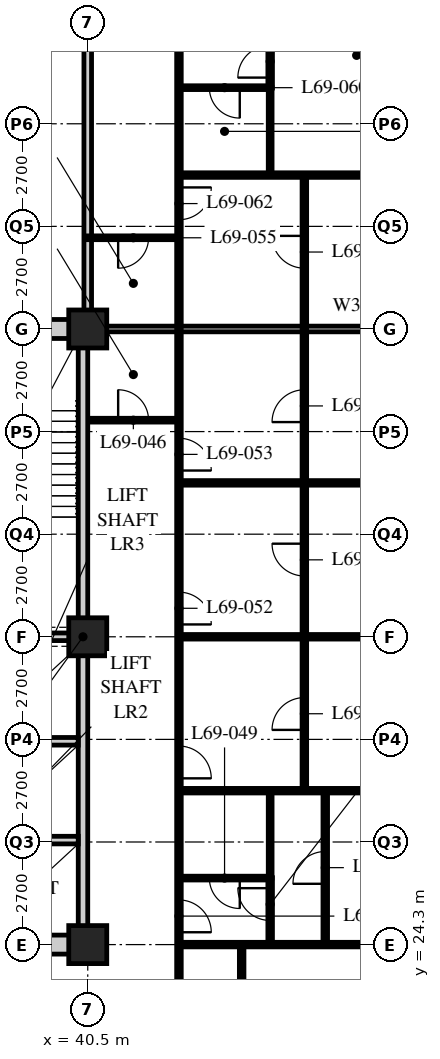
"""IFC4 building model, lengths in metres.
Left out: names, types, materials, properties, quantities, classifications, styles, units other than length and angle.
Written with IfcOpenShell. Run it as: python <this file> out.ifc"""

import sys

from ifc_helpers import new_model, si_unit, direction, frame, frame_2d, origin, origin_2d, place, context, subcontext, project, spatial, rectangle, hollow_rectangle, extrude, element, fill, save


model = new_model("IFC4")
c1 = context("Model", 3, precision=1e-05, world=origin(), true_north=direction((0.0, 1.0)))
c2 = subcontext(c1, "Body", "Model", "MODEL_VIEW")
j1 = project(units=[si_unit("LENGTHUNIT", "METRE"), si_unit("PLANEANGLEUNIT", "RADIAN")], contexts=[c1])
p1 = place(None, origin())
s1 = spatial("IfcSite", under=j1, at=p1, CompositionType="ELEMENT")
p2 = place(p1, origin())
s2 = spatial("IfcBuilding", under=s1, at=p2, CompositionType="ELEMENT")
p3 = place(p2, frame((0.0, 0.0, 269.7)))
s3 = spatial("IfcBuildingStorey", under=s2, at=p3, CompositionType="ELEMENT", Elevation=269.7)
for number, where, z_axis, x_axis in (
    (1, (40.5, 24.3, 0.0), (0.0, 0.0, 1.0), (1.0, 0.0, 0.0)),
    (2, (40.5, 32.4, 0.0), (0.0, 0.0, 1.0), (1.0, 0.0, 0.0)),
    (3, (40.5, 40.5, 0.0), (0.0, 0.0, 1.0), (1.0, 0.0, 0.0)),
):
    element("IfcColumn", number, at=place(p3, frame(where, z_axis=z_axis, x_axis=x_axis)), inside=s3, PredefinedType="COLUMN", context=c2, shape_type="SweptSolid", body=[
        extrude(hollow_rectangle(XDim=1.0, YDim=1.0, WallThickness=0.1, at=origin_2d()), origin(), (0.0, 0.0, 1.0), 3.9),
    ])
p4 = place(p3, frame((40.5, 40.5, 0.0), z_axis=(0.0, 0.0, 1.0), x_axis=(0.0, 1.0, 0.0)))
e4 = element("IfcWall", 4, at=p4, inside=s3, PredefinedType="SOLIDWALL", context=c2, shape_type="SweptSolid", body=[
    extrude(rectangle(XDim=10.35, YDim=0.2, at=frame_2d((5.175, 0.0))), origin(), (0.0, 0.0, 1.0), 3.078),
])
p5 = place(p3, frame((40.5, 38.1, 0.0), z_axis=(0.0, 0.0, 1.0), x_axis=(1.0, 0.0, 0.0)))
e5 = element("IfcWall", 5, at=p5, inside=s3, PredefinedType="PARTITIONING", context=c2, shape_type="SweptSolid", body=[
    extrude(rectangle(XDim=2.4, YDim=0.1, at=frame_2d((1.2, 0.0))), origin(), (0.0, 0.0, 1.0), 3.69),
])
p6 = place(p5, frame((0.8, 0.0, 0.0)))
e6 = element("IfcOpeningElement", 6, at=p6, cuts=e5, PredefinedType="OPENING", context=c2, shape_type="SweptSolid", body=[
    extrude(rectangle(XDim=0.8, YDim=2.1, at=frame_2d((0.4, 1.05))), frame((0.0, 0.06, 0.0), z_axis=(0.0, -1.0, 0.0), x_axis=(1.0, 0.0, 0.0)), (0.0, 0.0, 1.0), 0.12),
])
p7 = place(p3, frame((42.9, 22.5, 0.0), z_axis=(0.0, 0.0, 1.0), x_axis=(0.0, 1.0, 0.0)))
e7 = element("IfcWall", 7, at=p7, inside=s3, PredefinedType="PARTITIONING", context=c2, shape_type="SweptSolid", body=[
    extrude(rectangle(XDim=18.0, YDim=0.12, at=frame_2d((9.0, 0.0))), origin(), (0.0, 0.0, 1.0), 3.69),
])
p8 = place(p7, frame((2.125, 0.0, 0.0)))
e8 = element("IfcOpeningElement", 8, at=p8, cuts=e7, PredefinedType="OPENING", context=c2, shape_type="SweptSolid", body=[
    extrude(rectangle(XDim=0.85, YDim=2.1, at=frame_2d((0.425, 1.05))), frame((0.0, 0.07, 0.0), z_axis=(0.0, -1.0, 0.0), x_axis=(1.0, 0.0, 0.0)), (0.0, 0.0, 1.0), 0.14),
])
p9 = place(p7, frame((6.175, 0.0, 0.0)))
e9 = element("IfcOpeningElement", 9, at=p9, cuts=e7, PredefinedType="OPENING", context=c2, shape_type="SweptSolid", body=[
    extrude(rectangle(XDim=0.85, YDim=2.1, at=frame_2d((0.425, 1.05))), frame((0.0, 0.07, 0.0), z_axis=(0.0, -1.0, 0.0), x_axis=(1.0, 0.0, 0.0)), (0.0, 0.0, 1.0), 0.14),
])
p10 = place(p7, frame((10.225, 0.0, 0.0)))
e10 = element("IfcOpeningElement", 10, at=p10, cuts=e7, PredefinedType="OPENING", context=c2, shape_type="SweptSolid", body=[
    extrude(rectangle(XDim=0.85, YDim=2.1, at=frame_2d((0.425, 1.05))), frame((0.0, 0.07, 0.0), z_axis=(0.0, -1.0, 0.0), x_axis=(1.0, 0.0, 0.0)), (0.0, 0.0, 1.0), 0.14),
])
p11 = place(p7, frame((14.275, 0.0, 0.0)))
e11 = element("IfcOpeningElement", 11, at=p11, cuts=e7, PredefinedType="OPENING", context=c2, shape_type="SweptSolid", body=[
    extrude(rectangle(XDim=0.85, YDim=2.1, at=frame_2d((0.425, 1.05))), frame((0.0, 0.07, 0.0), z_axis=(0.0, -1.0, 0.0), x_axis=(1.0, 0.0, 0.0)), (0.0, 0.0, 1.0), 0.14),
])
p12 = place(p3, frame((42.9, 24.3, 0.0), z_axis=(0.0, 0.0, 1.0), x_axis=(1.0, 0.0, 0.0)))
e12 = element("IfcWall", 12, at=p12, inside=s3, PredefinedType="PARTITIONING", context=c2, shape_type="SweptSolid", body=[
    extrude(rectangle(XDim=9.45, YDim=0.12, at=frame_2d((4.725, 0.0))), origin(), (0.0, 0.0, 1.0), 3.078),
])
p13 = place(p3, frame((40.5, 40.5, 0.0), z_axis=(0.0, 0.0, 1.0), x_axis=(1.0, 0.0, 0.0)))
e13 = element("IfcWall", 13, at=p13, inside=s3, PredefinedType="PARTITIONING", context=c2, shape_type="SweptSolid", body=[
    extrude(rectangle(XDim=15.9, YDim=0.15, at=frame_2d((7.95, 0.0))), origin(), (0.0, 0.0, 1.0), 3.078),
])
p14 = place(p3, frame((44.55, 16.5, 0.0), z_axis=(0.0, 0.0, 1.0), x_axis=(0.0, 1.0, 0.0)))
e14 = element("IfcWall", 14, at=p14, inside=s3, PredefinedType="PARTITIONING", context=c2, shape_type="SweptSolid", body=[
    extrude(rectangle(XDim=7.8, YDim=0.12, at=frame_2d((3.9, 0.0))), origin(), (0.0, 0.0, 1.0), 3.69),
])
p15 = place(p14, frame((3.475, 0.0, 0.0)))
e15 = element("IfcOpeningElement", 15, at=p15, cuts=e14, PredefinedType="OPENING", context=c2, shape_type="SweptSolid", body=[
    extrude(rectangle(XDim=0.85, YDim=2.1, at=frame_2d((0.425, 1.05))), frame((0.0, 0.07, 0.0), z_axis=(0.0, -1.0, 0.0), x_axis=(1.0, 0.0, 0.0)), (0.0, 0.0, 1.0), 0.14),
])
p16 = place(p3, frame((42.9, 26.05, 0.0), z_axis=(0.0, 0.0, 1.0), x_axis=(1.0, 0.0, 0.0)))
e16 = element("IfcWall", 16, at=p16, inside=s3, PredefinedType="PARTITIONING", context=c2, shape_type="SweptSolid", body=[
    extrude(rectangle(XDim=2.4, YDim=0.1, at=frame_2d((1.2, 0.0))), origin(), (0.0, 0.0, 1.0), 3.69),
])
p17 = place(p16, frame((0.8, 0.0, 0.0)))
e17 = element("IfcOpeningElement", 17, at=p17, cuts=e16, PredefinedType="OPENING", context=c2, shape_type="SweptSolid", body=[
    extrude(rectangle(XDim=0.8, YDim=2.1, at=frame_2d((0.4, 1.05))), frame((0.0, 0.06, 0.0), z_axis=(0.0, -1.0, 0.0), x_axis=(1.0, 0.0, 0.0)), (0.0, 0.0, 1.0), 0.12),
])
p18 = place(p3, frame((45.3, 26.05, 0.0), z_axis=(0.0, 0.0, 1.0), x_axis=(0.0, 1.0, 0.0)))
e18 = element("IfcWall", 18, at=p18, inside=s3, PredefinedType="PARTITIONING", context=c2, shape_type="SweptSolid", body=[
    extrude(rectangle(XDim=2.3, YDim=0.1, at=frame_2d((1.15, 0.0))), origin(), (0.0, 0.0, 1.0), 3.69),
])
p19 = place(p3, frame((42.9, 28.35, 0.0), z_axis=(0.0, 0.0, 1.0), x_axis=(1.0, 0.0, 0.0)))
e19 = element("IfcWall", 19, at=p19, inside=s3, PredefinedType="PARTITIONING", context=c2, shape_type="SweptSolid", body=[
    extrude(rectangle(XDim=13.5, YDim=0.12, at=frame_2d((6.75, 0.0))), origin(), (0.0, 0.0, 1.0), 3.69),
])
p20 = place(p3, frame((42.9, 32.4, 0.0), z_axis=(0.0, 0.0, 1.0), x_axis=(1.0, 0.0, 0.0)))
e20 = element("IfcWall", 20, at=p20, inside=s3, PredefinedType="PARTITIONING", context=c2, shape_type="SweptSolid", body=[
    extrude(rectangle(XDim=13.5, YDim=0.12, at=frame_2d((6.75, 0.0))), origin(), (0.0, 0.0, 1.0), 3.078),
])
p21 = place(p3, frame((42.9, 36.45, 0.0), z_axis=(0.0, 0.0, 1.0), x_axis=(1.0, 0.0, 0.0)))
e21 = element("IfcWall", 21, at=p21, inside=s3, PredefinedType="PARTITIONING", context=c2, shape_type="SweptSolid", body=[
    extrude(rectangle(XDim=13.5, YDim=0.12, at=frame_2d((6.75, 0.0))), origin(), (0.0, 0.0, 1.0), 3.69),
])
p22 = place(p3, frame((40.5, 42.9, 0.0), z_axis=(0.0, 0.0, 1.0), x_axis=(1.0, 0.0, 0.0)))
e22 = element("IfcWall", 22, at=p22, inside=s3, PredefinedType="PARTITIONING", context=c2, shape_type="SweptSolid", body=[
    extrude(rectangle(XDim=2.4, YDim=0.1, at=frame_2d((1.2, 0.0))), origin(), (0.0, 0.0, 1.0), 3.69),
])
p23 = place(p22, frame((0.8, 0.0, 0.0)))
e23 = element("IfcOpeningElement", 23, at=p23, cuts=e22, PredefinedType="OPENING", context=c2, shape_type="SweptSolid", body=[
    extrude(rectangle(XDim=0.8, YDim=2.1, at=frame_2d((0.4, 1.05))), frame((0.0, 0.06, 0.0), z_axis=(0.0, -1.0, 0.0), x_axis=(1.0, 0.0, 0.0)), (0.0, 0.0, 1.0), 0.12),
])
p24 = place(p3, frame((42.9, 52.65, 0.0), z_axis=(0.0, 0.0, 1.0), x_axis=(0.0, -1.0, 0.0)))
e24 = element("IfcWall", 24, at=p24, inside=s3, PredefinedType="PARTITIONING", context=c2, shape_type="SweptSolid", body=[
    extrude(rectangle(XDim=12.15, YDim=0.12, at=frame_2d((6.075, 0.0))), origin(), (0.0, 0.0, 1.0), 3.69),
])
p25 = place(p24, frame((2.125, 0.0, 0.0)))
e25 = element("IfcOpeningElement", 25, at=p25, cuts=e24, PredefinedType="OPENING", context=c2, shape_type="SweptSolid", body=[
    extrude(rectangle(XDim=0.85, YDim=2.1, at=frame_2d((0.425, 1.05))), frame((0.0, 0.07, 0.0), z_axis=(0.0, -1.0, 0.0), x_axis=(1.0, 0.0, 0.0)), (0.0, 0.0, 1.0), 0.14),
])
p26 = place(p24, frame((8.425, 0.0, 0.0)))
e26 = element("IfcOpeningElement", 26, at=p26, cuts=e24, PredefinedType="OPENING", context=c2, shape_type="SweptSolid", body=[
    extrude(rectangle(XDim=0.85, YDim=2.1, at=frame_2d((0.425, 1.05))), frame((0.0, 0.07, 0.0), z_axis=(0.0, -1.0, 0.0), x_axis=(1.0, 0.0, 0.0)), (0.0, 0.0, 1.0), 0.14),
])
p27 = place(p3, frame((42.9, 46.85, 0.0), z_axis=(0.0, 0.0, 1.0), x_axis=(1.0, 0.0, 0.0)))
e27 = element("IfcWall", 27, at=p27, inside=s3, PredefinedType="PARTITIONING", context=c2, shape_type="SweptSolid", body=[
    extrude(rectangle(XDim=2.4, YDim=0.1, at=frame_2d((1.2, 0.0))), origin(), (0.0, 0.0, 1.0), 3.69),
])
p28 = place(p27, frame((0.8, 0.0, 0.0)))
e28 = element("IfcOpeningElement", 28, at=p28, cuts=e27, PredefinedType="OPENING", context=c2, shape_type="SweptSolid", body=[
    extrude(rectangle(XDim=0.8, YDim=2.1, at=frame_2d((0.4, 1.05))), frame((0.0, 0.06, 0.0), z_axis=(0.0, -1.0, 0.0), x_axis=(1.0, 0.0, 0.0)), (0.0, 0.0, 1.0), 0.12),
])
p29 = place(p3, frame((45.3, 46.85, 0.0), z_axis=(0.0, 0.0, 1.0), x_axis=(0.0, -1.0, 0.0)))
e29 = element("IfcWall", 29, at=p29, inside=s3, PredefinedType="PARTITIONING", context=c2, shape_type="SweptSolid", body=[
    extrude(rectangle(XDim=2.3, YDim=0.1, at=frame_2d((1.15, 0.0))), origin(), (0.0, 0.0, 1.0), 3.69),
])
p30 = place(p3, frame((42.9, 44.55, 0.0), z_axis=(0.0, 0.0, 1.0), x_axis=(1.0, 0.0, 0.0)))
e30 = element("IfcWall", 30, at=p30, inside=s3, PredefinedType="PARTITIONING", context=c2, shape_type="SweptSolid", body=[
    extrude(rectangle(XDim=13.5, YDim=0.12, at=frame_2d((6.75, 0.0))), origin(), (0.0, 0.0, 1.0), 3.69),
])
p31 = place(p3, frame((45.3, 24.3, 0.0), z_axis=(0.0, 0.0, 1.0), x_axis=(0.0, 1.0, 0.0)))
e31 = element("IfcWall", 31, at=p31, inside=s3, PredefinedType="PARTITIONING", context=c2, shape_type="SweptSolid", body=[
    extrude(rectangle(XDim=1.76, YDim=0.12, at=frame_2d((0.88, 0.0))), origin(), (0.0, 0.0, 1.0), 3.69),
])
p32 = place(p31, frame((0.635, 0.0, 0.0)))
e32 = element("IfcOpeningElement", 32, at=p32, cuts=e31, PredefinedType="OPENING", context=c2, shape_type="SweptSolid", body=[
    extrude(rectangle(XDim=0.85, YDim=2.1, at=frame_2d((0.425, 1.05))), frame((0.0, 0.07, 0.0), z_axis=(0.0, -1.0, 0.0), x_axis=(1.0, 0.0, 0.0)), (0.0, 0.0, 1.0), 0.14),
])
p33 = place(p3, frame((45.3, 50.85, 0.0), z_axis=(0.0, 0.0, 1.0), x_axis=(0.0, -1.0, 0.0)))
e33 = element("IfcWall", 33, at=p33, inside=s3, PredefinedType="PARTITIONING", context=c2, shape_type="SweptSolid", body=[
    extrude(rectangle(XDim=4.01, YDim=0.12, at=frame_2d((2.005, 0.0))), origin(), (0.0, 0.0, 1.0), 3.69),
])
p34 = place(p33, frame((2.885, 0.0, 0.0)))
e34 = element("IfcOpeningElement", 34, at=p34, cuts=e33, PredefinedType="OPENING", context=c2, shape_type="SweptSolid", body=[
    extrude(rectangle(XDim=0.85, YDim=2.1, at=frame_2d((0.425, 1.05))), frame((0.0, 0.07, 0.0), z_axis=(0.0, -1.0, 0.0), x_axis=(1.0, 0.0, 0.0)), (0.0, 0.0, 1.0), 0.14),
])
p35 = place(p3, frame((46.75, 24.3, 0.0), z_axis=(0.0, 0.0, 1.0), x_axis=(0.0, 1.0, 0.0)))
e35 = element("IfcWall", 35, at=p35, inside=s3, PredefinedType="PARTITIONING", context=c2, shape_type="SweptSolid", body=[
    extrude(rectangle(XDim=4.05, YDim=0.12, at=frame_2d((2.025, 0.0))), origin(), (0.0, 0.0, 1.0), 3.69),
])
p36 = place(p35, frame((1.6, 0.0, 0.0)))
e36 = element("IfcOpeningElement", 36, at=p36, cuts=e35, PredefinedType="OPENING", context=c2, shape_type="SweptSolid", body=[
    extrude(rectangle(XDim=0.85, YDim=2.1, at=frame_2d((0.425, 1.05))), frame((0.0, 0.07, 0.0), z_axis=(0.0, -1.0, 0.0), x_axis=(1.0, 0.0, 0.0)), (0.0, 0.0, 1.0), 0.14),
])
p37 = place(p3, frame((46.2, 28.35, 0.0), z_axis=(0.0, 0.0, 1.0), x_axis=(0.0, 1.0, 0.0)))
e37 = element("IfcWall", 37, at=p37, inside=s3, PredefinedType="PARTITIONING", context=c2, shape_type="SweptSolid", body=[
    extrude(rectangle(XDim=16.2, YDim=0.12, at=frame_2d((8.1, 0.0))), origin(), (0.0, 0.0, 1.0), 3.69),
])
p38 = place(p37, frame((1.6, 0.0, 0.0)))
e38 = element("IfcOpeningElement", 38, at=p38, cuts=e37, PredefinedType="OPENING", context=c2, shape_type="SweptSolid", body=[
    extrude(rectangle(XDim=0.85, YDim=2.1, at=frame_2d((0.425, 1.05))), frame((0.0, 0.07, 0.0), z_axis=(0.0, -1.0, 0.0), x_axis=(1.0, 0.0, 0.0)), (0.0, 0.0, 1.0), 0.14),
])
p39 = place(p37, frame((5.65, 0.0, 0.0)))
e39 = element("IfcOpeningElement", 39, at=p39, cuts=e37, PredefinedType="OPENING", context=c2, shape_type="SweptSolid", body=[
    extrude(rectangle(XDim=0.85, YDim=2.1, at=frame_2d((0.425, 1.05))), frame((0.0, 0.07, 0.0), z_axis=(0.0, -1.0, 0.0), x_axis=(1.0, 0.0, 0.0)), (0.0, 0.0, 1.0), 0.14),
])
p40 = place(p37, frame((9.7, 0.0, 0.0)))
e40 = element("IfcOpeningElement", 40, at=p40, cuts=e37, PredefinedType="OPENING", context=c2, shape_type="SweptSolid", body=[
    extrude(rectangle(XDim=0.85, YDim=2.1, at=frame_2d((0.425, 1.05))), frame((0.0, 0.07, 0.0), z_axis=(0.0, -1.0, 0.0), x_axis=(1.0, 0.0, 0.0)), (0.0, 0.0, 1.0), 0.14),
])
p41 = place(p37, frame((13.75, 0.0, 0.0)))
e41 = element("IfcOpeningElement", 41, at=p41, cuts=e37, PredefinedType="OPENING", context=c2, shape_type="SweptSolid", body=[
    extrude(rectangle(XDim=0.85, YDim=2.1, at=frame_2d((0.425, 1.05))), frame((0.0, 0.07, 0.0), z_axis=(0.0, -1.0, 0.0), x_axis=(1.0, 0.0, 0.0)), (0.0, 0.0, 1.0), 0.14),
])
p42 = place(p3, frame((15.95, 24.3, 0.0), z_axis=(0.0, 0.0, 1.0), x_axis=(1.0, 0.0, 0.0)))
e42 = element("IfcWall", 42, at=p42, inside=s3, PredefinedType="SOLIDWALL", context=c2, shape_type="SweptSolid", body=[
    extrude(rectangle(XDim=24.55, YDim=0.5, at=frame_2d((12.275, 0.0))), origin(), (0.0, 0.0, 1.0), 3.04),
])
p43 = place(p42, frame((11.5, 0.0, 0.0)))
e43 = element("IfcOpeningElement", 43, at=p43, cuts=e42, PredefinedType="OPENING", context=c2, shape_type="SweptSolid", body=[
    extrude(rectangle(XDim=1.8, YDim=2.4, at=frame_2d((0.9, 1.2))), frame((0.0, 0.26, 0.0), z_axis=(0.0, -1.0, 0.0), x_axis=(1.0, 0.0, 0.0)), (0.0, 0.0, 1.0), 0.52),
])
p44 = place(p3, frame((15.95, 40.5, 0.0), z_axis=(0.0, 0.0, 1.0), x_axis=(1.0, 0.0, 0.0)))
e44 = element("IfcWall", 44, at=p44, inside=s3, PredefinedType="SOLIDWALL", context=c2, shape_type="SweptSolid", body=[
    extrude(rectangle(XDim=24.55, YDim=0.5, at=frame_2d((12.275, 0.0))), origin(), (0.0, 0.0, 1.0), 3.04),
])
p45 = place(p44, frame((11.5, 0.0, 0.0)))
e45 = element("IfcOpeningElement", 45, at=p45, cuts=e44, PredefinedType="OPENING", context=c2, shape_type="SweptSolid", body=[
    extrude(rectangle(XDim=1.8, YDim=2.4, at=frame_2d((0.9, 1.2))), frame((0.0, 0.26, 0.0), z_axis=(0.0, -1.0, 0.0), x_axis=(1.0, 0.0, 0.0)), (0.0, 0.0, 1.0), 0.52),
])
p46 = place(p3, frame((40.375, 24.55, 0.0), z_axis=(0.0, 0.0, 1.0), x_axis=(0.0, 1.0, 0.0)))
e46 = element("IfcWall", 46, at=p46, inside=s3, PredefinedType="SOLIDWALL", context=c2, shape_type="SweptSolid", body=[
    extrude(rectangle(XDim=15.7, YDim=0.25, at=frame_2d((7.85, 0.0))), origin(), (0.0, 0.0, 1.0), 3.078),
])
p47 = place(p3, frame((32.3, 32.4, 0.0), z_axis=(0.0, 0.0, 1.0), x_axis=(1.0, 0.0, 0.0)))
e47 = element("IfcWall", 47, at=p47, inside=s3, PredefinedType="SOLIDWALL", context=c2, shape_type="SweptSolid", body=[
    extrude(rectangle(XDim=7.95, YDim=0.2, at=frame_2d((3.975, 0.0))), origin(), (0.0, 0.0, 1.0), 3.078),
])
for number, where, z_axis, x_axis in (
    (48, (37.65, 27.05, 0.0), (0.0, 0.0, 1.0), (1.0, 0.0, 0.0)),
    (49, (37.65, 29.65, 0.0), (0.0, 0.0, 1.0), (1.0, 0.0, 0.0)),
):
    element("IfcWall", number, at=place(p3, frame(where, z_axis=z_axis, x_axis=x_axis)), inside=s3, PredefinedType="SOLIDWALL", context=c2, shape_type="SweptSolid", body=[
        extrude(rectangle(XDim=2.6, YDim=0.2, at=frame_2d((1.3, 0.0))), origin(), (0.0, 0.0, 1.0), 3.69),
    ])
p48 = place(p6, origin())
e50 = element("IfcDoor", 50, at=p48, inside=s3, OperationType="SINGLE_SWING_LEFT", PredefinedType="DOOR", context=c2, shape_type="SweptSolid", body=[
    extrude(rectangle(XDim=0.8, YDim=2.1, at=frame_2d((0.4, 1.05))), frame((0.0, 0.025, 0.0), z_axis=(0.0, -1.0, 0.0), x_axis=(1.0, 0.0, 0.0)), (0.0, 0.0, 1.0), 0.05),
])
fill(e6, e50)
p49 = place(p17, origin())
e51 = element("IfcDoor", 51, at=p49, inside=s3, OperationType="SINGLE_SWING_LEFT", PredefinedType="DOOR", context=c2, shape_type="SweptSolid", body=[
    extrude(rectangle(XDim=0.8, YDim=2.1, at=frame_2d((0.4, 1.05))), frame((0.0, 0.025, 0.0), z_axis=(0.0, -1.0, 0.0), x_axis=(1.0, 0.0, 0.0)), (0.0, 0.0, 1.0), 0.05),
])
fill(e17, e51)
p50 = place(p8, origin())
e52 = element("IfcDoor", 52, at=p50, inside=s3, OperationType="SINGLE_SWING_RIGHT", PredefinedType="DOOR", context=c2, shape_type="SweptSolid", body=[
    extrude(rectangle(XDim=0.85, YDim=2.1, at=frame_2d((0.425, 1.05))), frame((0.0, 0.025, 0.0), z_axis=(0.0, -1.0, 0.0), x_axis=(1.0, 0.0, 0.0)), (0.0, 0.0, 1.0), 0.05),
])
fill(e8, e52)
p51 = place(p9, origin())
e53 = element("IfcDoor", 53, at=p51, inside=s3, OperationType="SINGLE_SWING_RIGHT", PredefinedType="DOOR", context=c2, shape_type="SweptSolid", body=[
    extrude(rectangle(XDim=0.85, YDim=2.1, at=frame_2d((0.425, 1.05))), frame((0.0, 0.025, 0.0), z_axis=(0.0, -1.0, 0.0), x_axis=(1.0, 0.0, 0.0)), (0.0, 0.0, 1.0), 0.05),
])
fill(e9, e53)
p52 = place(p10, origin())
e54 = element("IfcDoor", 54, at=p52, inside=s3, OperationType="SINGLE_SWING_RIGHT", PredefinedType="DOOR", context=c2, shape_type="SweptSolid", body=[
    extrude(rectangle(XDim=0.85, YDim=2.1, at=frame_2d((0.425, 1.05))), frame((0.0, 0.025, 0.0), z_axis=(0.0, -1.0, 0.0), x_axis=(1.0, 0.0, 0.0)), (0.0, 0.0, 1.0), 0.05),
])
fill(e10, e54)
p53 = place(p11, origin())
e55 = element("IfcDoor", 55, at=p53, inside=s3, OperationType="SINGLE_SWING_RIGHT", PredefinedType="DOOR", context=c2, shape_type="SweptSolid", body=[
    extrude(rectangle(XDim=0.85, YDim=2.1, at=frame_2d((0.425, 1.05))), frame((0.0, 0.025, 0.0), z_axis=(0.0, -1.0, 0.0), x_axis=(1.0, 0.0, 0.0)), (0.0, 0.0, 1.0), 0.05),
])
fill(e11, e55)
p54 = place(p23, origin())
e56 = element("IfcDoor", 56, at=p54, inside=s3, OperationType="SINGLE_SWING_RIGHT", PredefinedType="DOOR", context=c2, shape_type="SweptSolid", body=[
    extrude(rectangle(XDim=0.8, YDim=2.1, at=frame_2d((0.4, 1.05))), frame((0.0, 0.025, 0.0), z_axis=(0.0, -1.0, 0.0), x_axis=(1.0, 0.0, 0.0)), (0.0, 0.0, 1.0), 0.05),
])
fill(e23, e56)
p55 = place(p28, origin())
e57 = element("IfcDoor", 57, at=p55, inside=s3, OperationType="SINGLE_SWING_LEFT", PredefinedType="DOOR", context=c2, shape_type="SweptSolid", body=[
    extrude(rectangle(XDim=0.8, YDim=2.1, at=frame_2d((0.4, 1.05))), frame((0.0, 0.025, 0.0), z_axis=(0.0, -1.0, 0.0), x_axis=(1.0, 0.0, 0.0)), (0.0, 0.0, 1.0), 0.05),
])
fill(e28, e57)
p56 = place(p26, origin())
e58 = element("IfcDoor", 58, at=p56, inside=s3, OperationType="SINGLE_SWING_LEFT", PredefinedType="DOOR", context=c2, shape_type="SweptSolid", body=[
    extrude(rectangle(XDim=0.85, YDim=2.1, at=frame_2d((0.425, 1.05))), frame((0.0, 0.025, 0.0), z_axis=(0.0, -1.0, 0.0), x_axis=(1.0, 0.0, 0.0)), (0.0, 0.0, 1.0), 0.05),
])
fill(e26, e58)
p57 = place(p32, origin())
e59 = element("IfcDoor", 59, at=p57, inside=s3, OperationType="SINGLE_SWING_RIGHT", PredefinedType="DOOR", context=c2, shape_type="SweptSolid", body=[
    extrude(rectangle(XDim=0.85, YDim=2.1, at=frame_2d((0.425, 1.05))), frame((0.0, 0.025, 0.0), z_axis=(0.0, -1.0, 0.0), x_axis=(1.0, 0.0, 0.0)), (0.0, 0.0, 1.0), 0.05),
])
fill(e32, e59)
p58 = place(p34, origin())
e60 = element("IfcDoor", 60, at=p58, inside=s3, OperationType="SINGLE_SWING_LEFT", PredefinedType="DOOR", context=c2, shape_type="SweptSolid", body=[
    extrude(rectangle(XDim=0.85, YDim=2.1, at=frame_2d((0.425, 1.05))), frame((0.0, 0.025, 0.0), z_axis=(0.0, -1.0, 0.0), x_axis=(1.0, 0.0, 0.0)), (0.0, 0.0, 1.0), 0.05),
])
fill(e34, e60)
p59 = place(p36, origin())
e61 = element("IfcDoor", 61, at=p59, inside=s3, OperationType="SINGLE_SWING_LEFT", PredefinedType="DOOR", context=c2, shape_type="SweptSolid", body=[
    extrude(rectangle(XDim=0.85, YDim=2.1, at=frame_2d((0.425, 1.05))), frame((0.0, 0.025, 0.0), z_axis=(0.0, -1.0, 0.0), x_axis=(1.0, 0.0, 0.0)), (0.0, 0.0, 1.0), 0.05),
])
fill(e36, e61)
p60 = place(p38, origin())
e62 = element("IfcDoor", 62, at=p60, inside=s3, OperationType="SINGLE_SWING_LEFT", PredefinedType="DOOR", context=c2, shape_type="SweptSolid", body=[
    extrude(rectangle(XDim=0.85, YDim=2.1, at=frame_2d((0.425, 1.05))), frame((0.0, 0.025, 0.0), z_axis=(0.0, -1.0, 0.0), x_axis=(1.0, 0.0, 0.0)), (0.0, 0.0, 1.0), 0.05),
])
fill(e38, e62)
p61 = place(p39, origin())
e63 = element("IfcDoor", 63, at=p61, inside=s3, OperationType="SINGLE_SWING_RIGHT", PredefinedType="DOOR", context=c2, shape_type="SweptSolid", body=[
    extrude(rectangle(XDim=0.85, YDim=2.1, at=frame_2d((0.425, 1.05))), frame((0.0, 0.025, 0.0), z_axis=(0.0, -1.0, 0.0), x_axis=(1.0, 0.0, 0.0)), (0.0, 0.0, 1.0), 0.05),
])
fill(e39, e63)
p62 = place(p40, origin())
e64 = element("IfcDoor", 64, at=p62, inside=s3, OperationType="SINGLE_SWING_LEFT", PredefinedType="DOOR", context=c2, shape_type="SweptSolid", body=[
    extrude(rectangle(XDim=0.85, YDim=2.1, at=frame_2d((0.425, 1.05))), frame((0.0, 0.025, 0.0), z_axis=(0.0, -1.0, 0.0), x_axis=(1.0, 0.0, 0.0)), (0.0, 0.0, 1.0), 0.05),
])
fill(e40, e64)
p63 = place(p41, origin())
e65 = element("IfcDoor", 65, at=p63, inside=s3, OperationType="SINGLE_SWING_RIGHT", PredefinedType="DOOR", context=c2, shape_type="SweptSolid", body=[
    extrude(rectangle(XDim=0.85, YDim=2.1, at=frame_2d((0.425, 1.05))), frame((0.0, 0.025, 0.0), z_axis=(0.0, -1.0, 0.0), x_axis=(1.0, 0.0, 0.0)), (0.0, 0.0, 1.0), 0.05),
])
fill(e41, e65)
save(model, sys.argv[1])
